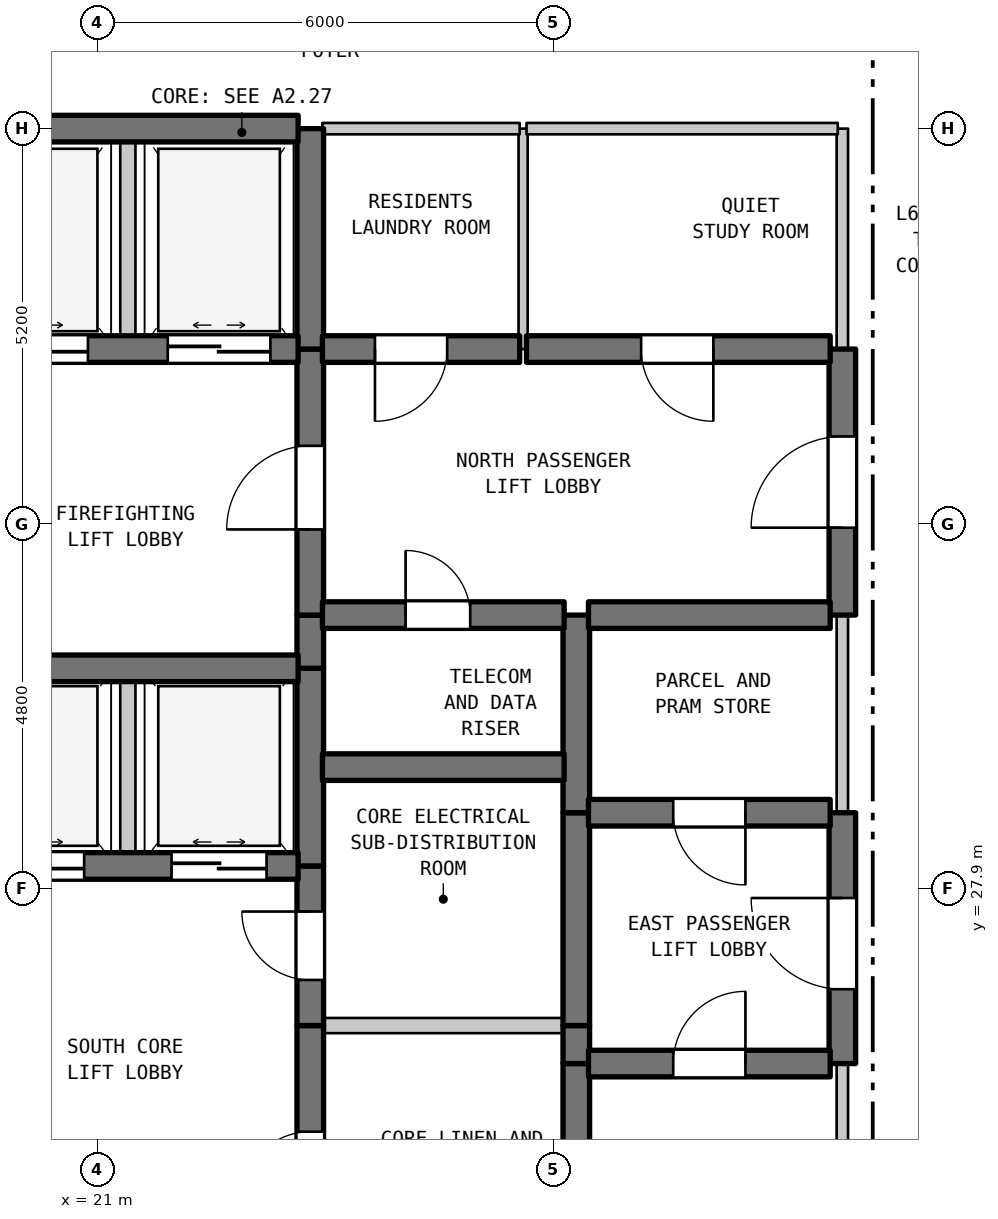
"""IFC4 building model, lengths in metres.
Left out: names, types, materials, properties, quantities, classifications, styles, units other than length and angle.
Written with IfcOpenShell. Run it as: python <this file> out.ifc"""

import sys

from ifc_helpers import new_model, si_unit, direction, frame, frame_2d, origin, place, context, subcontext, project, spatial, rectangle, extrude, element, fill, save


model = new_model("IFC4")
c1 = context("Model", 3, precision=1e-05, world=origin(), true_north=direction((0.0, 1.0)))
c2 = subcontext(c1, "Body", "Model", "MODEL_VIEW")
j1 = project(units=[si_unit("LENGTHUNIT", "METRE"), si_unit("PLANEANGLEUNIT", "RADIAN")], contexts=[c1])
p1 = place(None, origin())
s1 = spatial("IfcSite", under=j1, at=p1, CompositionType="ELEMENT")
p2 = place(p1, origin())
s2 = spatial("IfcBuilding", under=s1, at=p2, CompositionType="ELEMENT")
p3 = place(p2, frame((0.0, 0.0, 269.5)))
s3 = spatial("IfcBuildingStorey", under=s2, at=p3, CompositionType="ELEMENT", Elevation=269.5)
p4 = place(p3, frame((21.4, 28.2, 0.0), z_axis=(0.0, 0.0, 1.0), x_axis=(0.0, 1.0, 0.0)))
e1 = element("IfcWall", 1, at=p4, inside=s3, PredefinedType="STANDARD", context=c2, shape_type="SweptSolid", body=[
    extrude(rectangle(XDim=2.6, YDim=0.2, at=frame_2d((1.3, 0.0))), origin(), (0.0, 0.0, 1.0), 3.39),
])
p5 = place(p3, frame((21.4, 35.0, 0.0), z_axis=(0.0, 0.0, 1.0), x_axis=(0.0, 1.0, 0.0)))
e2 = element("IfcWall", 2, at=p5, inside=s3, PredefinedType="STANDARD", context=c2, shape_type="SweptSolid", body=[
    extrude(rectangle(XDim=2.9, YDim=0.2, at=frame_2d((1.45, 0.0))), origin(), (0.0, 0.0, 1.0), 3.39),
])
p6 = place(p3, frame((23.8, 19.5, 0.0), z_axis=(0.0, 0.0, 1.0), x_axis=(0.0, 1.0, 0.0)))
e3 = element("IfcWall", 3, at=p6, inside=s3, PredefinedType="SHEAR", context=c2, shape_type="SweptSolid", body=[
    extrude(rectangle(XDim=6.6, YDim=0.35, at=frame_2d((3.3, 0.0))), origin(), (0.0, 0.0, 1.0), 3.39),
])
p7 = place(p6, frame((4.304, 0.0, 0.0)))
e4 = element("IfcOpeningElement", 4, at=p7, cuts=e3, PredefinedType="OPENING", context=c2, shape_type="SweptSolid", body=[
    extrude(rectangle(XDim=0.9, YDim=2.15, at=frame_2d((0.45, 1.075))), frame((0.0, 0.185, 0.0), z_axis=(0.0, -1.0, 0.0), x_axis=(1.0, 0.0, 0.0)), (0.0, 0.0, 1.0), 0.37),
])
p8 = place(p3, frame((23.8, 26.1, 0.0), z_axis=(0.0, 0.0, 1.0), x_axis=(0.0, 1.0, 0.0)))
e5 = element("IfcWall", 5, at=p8, inside=s3, PredefinedType="SHEAR", context=c2, shape_type="SweptSolid", body=[
    extrude(rectangle(XDim=2.1, YDim=0.35, at=frame_2d((1.05, 0.0))), origin(), (0.0, 0.0, 1.0), 3.39),
])
p9 = place(p8, frame((0.6, 0.0, 0.0)))
e6 = element("IfcOpeningElement", 6, at=p9, cuts=e5, PredefinedType="OPENING", context=c2, shape_type="SweptSolid", body=[
    extrude(rectangle(XDim=0.9, YDim=2.15, at=frame_2d((0.45, 1.075))), frame((0.0, 0.185, 0.0), z_axis=(0.0, -1.0, 0.0), x_axis=(1.0, 0.0, 0.0)), (0.0, 0.0, 1.0), 0.37),
])
p10 = place(p3, frame((23.8, 28.2, 0.0), z_axis=(0.0, 0.0, 1.0), x_axis=(0.0, 1.0, 0.0)))
e7 = element("IfcWall", 7, at=p10, inside=s3, PredefinedType="SHEAR", context=c2, shape_type="SweptSolid", body=[
    extrude(rectangle(XDim=2.6, YDim=0.35, at=frame_2d((1.3, 0.0))), origin(), (0.0, 0.0, 1.0), 3.39),
])
p11 = place(p3, frame((23.8, 30.8, 0.0), z_axis=(0.0, 0.0, 1.0), x_axis=(0.0, 1.0, 0.0)))
e8 = element("IfcWall", 8, at=p11, inside=s3, PredefinedType="SHEAR", context=c2, shape_type="SweptSolid", body=[
    extrude(rectangle(XDim=0.7, YDim=0.35, at=frame_2d((0.35, 0.0))), origin(), (0.0, 0.0, 1.0), 3.39),
])
p12 = place(p3, frame((23.8, 31.5, 0.0), z_axis=(0.0, 0.0, 1.0), x_axis=(0.0, 1.0, 0.0)))
e9 = element("IfcWall", 9, at=p12, inside=s3, PredefinedType="SHEAR", context=c2, shape_type="SweptSolid", body=[
    extrude(rectangle(XDim=3.5, YDim=0.35, at=frame_2d((1.75, 0.0))), origin(), (0.0, 0.0, 1.0), 3.39),
])
p13 = place(p12, frame((1.127, 0.0, 0.0)))
e10 = element("IfcOpeningElement", 10, at=p13, cuts=e9, PredefinedType="OPENING", context=c2, shape_type="SweptSolid", body=[
    extrude(rectangle(XDim=1.1, YDim=2.15, at=frame_2d((0.55, 1.075))), frame((0.0, 0.185, 0.0), z_axis=(0.0, -1.0, 0.0), x_axis=(1.0, 0.0, 0.0)), (0.0, 0.0, 1.0), 0.37),
])
p14 = place(p3, frame((23.8, 35.0, 0.0), z_axis=(0.0, 0.0, 1.0), x_axis=(0.0, 1.0, 0.0)))
e11 = element("IfcWall", 11, at=p14, inside=s3, PredefinedType="SHEAR", context=c2, shape_type="SweptSolid", body=[
    extrude(rectangle(XDim=2.9, YDim=0.35, at=frame_2d((1.45, 0.0))), origin(), (0.0, 0.0, 1.0), 3.39),
])
p15 = place(p3, frame((26.6, 35.0, 0.0), z_axis=(0.0, 0.0, 1.0), x_axis=(0.0, 1.0, 0.0)))
e12 = element("IfcWall", 12, at=p15, inside=s3, PredefinedType="PARTITIONING", context=c2, shape_type="SweptSolid", body=[
    extrude(rectangle(XDim=2.9, YDim=0.12, at=frame_2d((1.45, 0.0))), origin(), (0.0, 0.0, 1.0), 3.39),
])
p16 = place(p3, frame((27.3, 22.7, 0.0), z_axis=(0.0, 0.0, 1.0), x_axis=(0.0, 1.0, 0.0)))
e13 = element("IfcWall", 13, at=p16, inside=s3, PredefinedType="SHEAR", context=c2, shape_type="SweptSolid", body=[
    extrude(rectangle(XDim=2.9, YDim=0.35, at=frame_2d((1.45, 0.0))), origin(), (0.0, 0.0, 1.0), 3.39),
])
p17 = place(p3, frame((27.3, 25.6, 0.0), z_axis=(0.0, 0.0, 1.0), x_axis=(0.0, 1.0, 0.0)))
e14 = element("IfcWall", 14, at=p17, inside=s3, PredefinedType="SHEAR", context=c2, shape_type="SweptSolid", body=[
    extrude(rectangle(XDim=0.5, YDim=0.35, at=frame_2d((0.25, 0.0))), origin(), (0.0, 0.0, 1.0), 3.39),
])
p18 = place(p3, frame((27.3, 26.1, 0.0), z_axis=(0.0, 0.0, 1.0), x_axis=(0.0, 1.0, 0.0)))
e15 = element("IfcWall", 15, at=p18, inside=s3, PredefinedType="SHEAR", context=c2, shape_type="SweptSolid", body=[
    extrude(rectangle(XDim=2.8, YDim=0.35, at=frame_2d((1.4, 0.0))), origin(), (0.0, 0.0, 1.0), 3.39),
])
p19 = place(p3, frame((27.3, 28.9, 0.0), z_axis=(0.0, 0.0, 1.0), x_axis=(0.0, 1.0, 0.0)))
e16 = element("IfcWall", 16, at=p19, inside=s3, PredefinedType="SHEAR", context=c2, shape_type="SweptSolid", body=[
    extrude(rectangle(XDim=2.6, YDim=0.35, at=frame_2d((1.3, 0.0))), origin(), (0.0, 0.0, 1.0), 3.39),
])
p20 = place(p3, frame((30.8, 22.7, 0.0), z_axis=(0.0, 0.0, 1.0), x_axis=(0.0, 1.0, 0.0)))
e17 = element("IfcWall", 17, at=p20, inside=s3, PredefinedType="STANDARD", context=c2, shape_type="SweptSolid", body=[
    extrude(rectangle(XDim=2.9, YDim=0.15, at=frame_2d((1.45, 0.0))), origin(), (0.0, 0.0, 1.0), 3.39),
])
p21 = place(p3, frame((30.8, 25.6, 0.0), z_axis=(0.0, 0.0, 1.0), x_axis=(0.0, 1.0, 0.0)))
e18 = element("IfcWall", 18, at=p21, inside=s3, PredefinedType="SHEAR", context=c2, shape_type="SweptSolid", body=[
    extrude(rectangle(XDim=3.3, YDim=0.35, at=frame_2d((1.65, 0.0))), origin(), (0.0, 0.0, 1.0), 3.39),
])
p22 = place(p21, frame((0.978, 0.0, 0.0)))
e19 = element("IfcOpeningElement", 19, at=p22, cuts=e18, PredefinedType="OPENING", context=c2, shape_type="SweptSolid", body=[
    extrude(rectangle(XDim=1.2, YDim=2.2, at=frame_2d((0.6, 1.1))), frame((0.0, 0.185, 0.0), z_axis=(0.0, -1.0, 0.0), x_axis=(1.0, 0.0, 0.0)), (0.0, 0.0, 1.0), 0.37),
])
p23 = place(p3, frame((30.8, 28.9, 0.0), z_axis=(0.0, 0.0, 1.0), x_axis=(0.0, 1.0, 0.0)))
e20 = element("IfcWall", 20, at=p23, inside=s3, PredefinedType="STANDARD", context=c2, shape_type="SweptSolid", body=[
    extrude(rectangle(XDim=2.6, YDim=0.15, at=frame_2d((1.3, 0.0))), origin(), (0.0, 0.0, 1.0), 3.39),
])
p24 = place(p3, frame((30.8, 31.5, 0.0), z_axis=(0.0, 0.0, 1.0), x_axis=(0.0, 1.0, 0.0)))
e21 = element("IfcWall", 21, at=p24, inside=s3, PredefinedType="SHEAR", context=c2, shape_type="SweptSolid", body=[
    extrude(rectangle(XDim=3.5, YDim=0.35, at=frame_2d((1.75, 0.0))), origin(), (0.0, 0.0, 1.0), 3.39),
])
p25 = place(p24, frame((1.15, 0.0, 0.0)))
e22 = element("IfcOpeningElement", 22, at=p25, cuts=e21, PredefinedType="OPENING", context=c2, shape_type="SweptSolid", body=[
    extrude(rectangle(XDim=1.2, YDim=2.2, at=frame_2d((0.6, 1.1))), frame((0.0, 0.185, 0.0), z_axis=(0.0, -1.0, 0.0), x_axis=(1.0, 0.0, 0.0)), (0.0, 0.0, 1.0), 0.37),
])
p26 = place(p3, frame((30.8, 35.0, 0.0), z_axis=(0.0, 0.0, 1.0), x_axis=(0.0, 1.0, 0.0)))
e23 = element("IfcWall", 23, at=p26, inside=s3, PredefinedType="STANDARD", context=c2, shape_type="SweptSolid", body=[
    extrude(rectangle(XDim=2.9, YDim=0.15, at=frame_2d((1.45, 0.0))), origin(), (0.0, 0.0, 1.0), 3.39),
])
p27 = place(p3, frame((27.46, 25.6, 0.0), z_axis=(0.0, 0.0, 1.0), x_axis=(1.0, 0.0, 0.0)))
e24 = element("IfcWall", 24, at=p27, inside=s3, PredefinedType="SHEAR", context=c2, shape_type="SweptSolid", body=[
    extrude(rectangle(XDim=3.18, YDim=0.35, at=frame_2d((1.59, 0.0))), origin(), (0.0, 0.0, 1.0), 3.39),
])
p28 = place(p27, frame((1.115, 0.0, 0.0)))
e25 = element("IfcOpeningElement", 25, at=p28, cuts=e24, PredefinedType="OPENING", context=c2, shape_type="SweptSolid", body=[
    extrude(rectangle(XDim=0.95, YDim=2.15, at=frame_2d((0.475, 1.075))), frame((0.0, 0.185, 0.0), z_axis=(0.0, -1.0, 0.0), x_axis=(1.0, 0.0, 0.0)), (0.0, 0.0, 1.0), 0.37),
])
p29 = place(p3, frame((23.96, 26.1, 0.0), z_axis=(0.0, 0.0, 1.0), x_axis=(1.0, 0.0, 0.0)))
e26 = element("IfcWall", 26, at=p29, inside=s3, PredefinedType="STANDARD", context=c2, shape_type="SweptSolid", body=[
    extrude(rectangle(XDim=3.18, YDim=0.2, at=frame_2d((1.59, 0.0))), origin(), (0.0, 0.0, 1.0), 3.39),
])
p30 = place(p3, frame((19.16, 28.2, 0.0), z_axis=(0.0, 0.0, 1.0), x_axis=(1.0, 0.0, 0.0)))
e27 = element("IfcWall", 27, at=p30, inside=s3, PredefinedType="SHEAR", context=c2, shape_type="SweptSolid", body=[
    extrude(rectangle(XDim=4.48, YDim=0.35, at=frame_2d((2.24, 0.0))), origin(), (0.0, 0.0, 1.0), 3.39),
])
p31 = place(p30, frame((0.415, 0.0, 0.0)))
e28 = element("IfcOpeningElement", 28, at=p31, cuts=e27, PredefinedType="OPENING", context=c2, shape_type="SweptSolid", body=[
    extrude(rectangle(XDim=1.25, YDim=2.2, at=frame_2d((0.625, 1.1))), frame((0.0, 0.185, 0.0), z_axis=(0.0, -1.0, 0.0), x_axis=(1.0, 0.0, 0.0)), (0.0, 0.0, 1.0), 0.37),
])
p32 = place(p30, frame((2.815, 0.0, 0.0)))
e29 = element("IfcOpeningElement", 29, at=p32, cuts=e27, PredefinedType="OPENING", context=c2, shape_type="SweptSolid", body=[
    extrude(rectangle(XDim=1.25, YDim=2.2, at=frame_2d((0.625, 1.1))), frame((0.0, 0.185, 0.0), z_axis=(0.0, -1.0, 0.0), x_axis=(1.0, 0.0, 0.0)), (0.0, 0.0, 1.0), 0.37),
])
p33 = place(p3, frame((27.46, 28.9, 0.0), z_axis=(0.0, 0.0, 1.0), x_axis=(1.0, 0.0, 0.0)))
e30 = element("IfcWall", 30, at=p33, inside=s3, PredefinedType="SHEAR", context=c2, shape_type="SweptSolid", body=[
    extrude(rectangle(XDim=3.18, YDim=0.35, at=frame_2d((1.59, 0.0))), origin(), (0.0, 0.0, 1.0), 3.39),
])
p34 = place(p33, frame((1.115, 0.0, 0.0)))
e31 = element("IfcOpeningElement", 31, at=p34, cuts=e30, PredefinedType="OPENING", context=c2, shape_type="SweptSolid", body=[
    extrude(rectangle(XDim=0.95, YDim=2.15, at=frame_2d((0.475, 1.075))), frame((0.0, 0.185, 0.0), z_axis=(0.0, -1.0, 0.0), x_axis=(1.0, 0.0, 0.0)), (0.0, 0.0, 1.0), 0.37),
])
p35 = place(p3, frame((23.96, 29.5, 0.0), z_axis=(0.0, 0.0, 1.0), x_axis=(1.0, 0.0, 0.0)))
e32 = element("IfcWall", 32, at=p35, inside=s3, PredefinedType="SHEAR", context=c2, shape_type="SweptSolid", body=[
    extrude(rectangle(XDim=3.18, YDim=0.35, at=frame_2d((1.59, 0.0))), origin(), (0.0, 0.0, 1.0), 3.39),
])
p36 = place(p3, frame((19.16, 30.8, 0.0), z_axis=(0.0, 0.0, 1.0), x_axis=(1.0, 0.0, 0.0)))
e33 = element("IfcWall", 33, at=p36, inside=s3, PredefinedType="SHEAR", context=c2, shape_type="SweptSolid", body=[
    extrude(rectangle(XDim=4.48, YDim=0.35, at=frame_2d((2.24, 0.0))), origin(), (0.0, 0.0, 1.0), 3.39),
])
p37 = place(p3, frame((23.96, 31.5, 0.0), z_axis=(0.0, 0.0, 1.0), x_axis=(1.0, 0.0, 0.0)))
e34 = element("IfcWall", 34, at=p37, inside=s3, PredefinedType="SHEAR", context=c2, shape_type="SweptSolid", body=[
    extrude(rectangle(XDim=3.18, YDim=0.35, at=frame_2d((1.59, 0.0))), origin(), (0.0, 0.0, 1.0), 3.39),
])
p38 = place(p37, frame((1.094, 0.0, 0.0)))
e35 = element("IfcOpeningElement", 35, at=p38, cuts=e34, PredefinedType="OPENING", context=c2, shape_type="SweptSolid", body=[
    extrude(rectangle(XDim=0.85, YDim=2.1, at=frame_2d((0.425, 1.05))), frame((0.0, 0.185, 0.0), z_axis=(0.0, -1.0, 0.0), x_axis=(1.0, 0.0, 0.0)), (0.0, 0.0, 1.0), 0.37),
])
p39 = place(p3, frame((27.46, 31.5, 0.0), z_axis=(0.0, 0.0, 1.0), x_axis=(1.0, 0.0, 0.0)))
e36 = element("IfcWall", 36, at=p39, inside=s3, PredefinedType="SHEAR", context=c2, shape_type="SweptSolid", body=[
    extrude(rectangle(XDim=3.18, YDim=0.35, at=frame_2d((1.59, 0.0))), origin(), (0.0, 0.0, 1.0), 3.39),
])
p40 = place(p3, frame((19.16, 35.0, 0.0), z_axis=(0.0, 0.0, 1.0), x_axis=(1.0, 0.0, 0.0)))
e37 = element("IfcWall", 37, at=p40, inside=s3, PredefinedType="SHEAR", context=c2, shape_type="SweptSolid", body=[
    extrude(rectangle(XDim=4.48, YDim=0.35, at=frame_2d((2.24, 0.0))), origin(), (0.0, 0.0, 1.0), 3.39),
])
p41 = place(p40, frame((0.365, 0.0, 0.0)))
e38 = element("IfcOpeningElement", 38, at=p41, cuts=e37, PredefinedType="OPENING", context=c2, shape_type="SweptSolid", body=[
    extrude(rectangle(XDim=1.35, YDim=2.2, at=frame_2d((0.675, 1.1))), frame((0.0, 0.185, 0.0), z_axis=(0.0, -1.0, 0.0), x_axis=(1.0, 0.0, 0.0)), (0.0, 0.0, 1.0), 0.37),
])
p42 = place(p40, frame((2.765, 0.0, 0.0)))
e39 = element("IfcOpeningElement", 39, at=p42, cuts=e37, PredefinedType="OPENING", context=c2, shape_type="SweptSolid", body=[
    extrude(rectangle(XDim=1.35, YDim=2.2, at=frame_2d((0.675, 1.1))), frame((0.0, 0.185, 0.0), z_axis=(0.0, -1.0, 0.0), x_axis=(1.0, 0.0, 0.0)), (0.0, 0.0, 1.0), 0.37),
])
p43 = place(p3, frame((23.96, 35.0, 0.0), z_axis=(0.0, 0.0, 1.0), x_axis=(1.0, 0.0, 0.0)))
e40 = element("IfcWall", 40, at=p43, inside=s3, PredefinedType="SHEAR", context=c2, shape_type="SweptSolid", body=[
    extrude(rectangle(XDim=2.595, YDim=0.35, at=frame_2d((1.297, 0.0))), origin(), (0.0, 0.0, 1.0), 3.39),
])
p44 = place(p43, frame((0.691, 0.0, 0.0)))
e41 = element("IfcOpeningElement", 41, at=p44, cuts=e40, PredefinedType="OPENING", context=c2, shape_type="SweptSolid", body=[
    extrude(rectangle(XDim=0.95, YDim=2.15, at=frame_2d((0.475, 1.075))), frame((0.0, 0.185, 0.0), z_axis=(0.0, -1.0, 0.0), x_axis=(1.0, 0.0, 0.0)), (0.0, 0.0, 1.0), 0.37),
])
p45 = place(p3, frame((26.645, 35.0, 0.0), z_axis=(0.0, 0.0, 1.0), x_axis=(1.0, 0.0, 0.0)))
e42 = element("IfcWall", 42, at=p45, inside=s3, PredefinedType="SHEAR", context=c2, shape_type="SweptSolid", body=[
    extrude(rectangle(XDim=3.995, YDim=0.35, at=frame_2d((1.998, 0.0))), origin(), (0.0, 0.0, 1.0), 3.39),
])
p46 = place(p45, frame((1.508, 0.0, 0.0)))
e43 = element("IfcOpeningElement", 43, at=p46, cuts=e42, PredefinedType="OPENING", context=c2, shape_type="SweptSolid", body=[
    extrude(rectangle(XDim=0.95, YDim=2.15, at=frame_2d((0.475, 1.075))), frame((0.0, 0.185, 0.0), z_axis=(0.0, -1.0, 0.0), x_axis=(1.0, 0.0, 0.0)), (0.0, 0.0, 1.0), 0.37),
])
p47 = place(p3, frame((19.16, 37.9, 0.0), z_axis=(0.0, 0.0, 1.0), x_axis=(1.0, 0.0, 0.0)))
e44 = element("IfcWall", 44, at=p47, inside=s3, PredefinedType="SHEAR", context=c2, shape_type="SweptSolid", body=[
    extrude(rectangle(XDim=4.48, YDim=0.35, at=frame_2d((2.24, 0.0))), origin(), (0.0, 0.0, 1.0), 3.39),
])
p48 = place(p3, frame((23.96, 37.9, 0.0), z_axis=(0.0, 0.0, 1.0), x_axis=(1.0, 0.0, 0.0)))
e45 = element("IfcWall", 45, at=p48, inside=s3, PredefinedType="STANDARD", context=c2, shape_type="SweptSolid", body=[
    extrude(rectangle(XDim=2.595, YDim=0.15, at=frame_2d((1.297, 0.0))), origin(), (0.0, 0.0, 1.0), 2.89),
])
p49 = place(p3, frame((26.645, 37.9, 0.0), z_axis=(0.0, 0.0, 1.0), x_axis=(1.0, 0.0, 0.0)))
e46 = element("IfcWall", 46, at=p49, inside=s3, PredefinedType="STANDARD", context=c2, shape_type="SweptSolid", body=[
    extrude(rectangle(XDim=4.095, YDim=0.15, at=frame_2d((2.047, 0.0))), origin(), (0.0, 0.0, 1.0), 2.89),
])
p50 = place(p7, origin())
e47 = element("IfcDoor", 47, at=p50, inside=s3, OperationType="SINGLE_SWING_LEFT", PredefinedType="DOOR", context=c2, shape_type="SweptSolid", body=[
    extrude(rectangle(XDim=0.9, YDim=2.15, at=frame_2d((0.45, 1.075))), frame((0.0, 0.025, 0.0), z_axis=(0.0, -1.0, 0.0), x_axis=(1.0, 0.0, 0.0)), (0.0, 0.0, 1.0), 0.05),
])
fill(e4, e47)
p51 = place(p9, origin())
e48 = element("IfcDoor", 48, at=p51, inside=s3, OperationType="SINGLE_SWING_RIGHT", PredefinedType="DOOR", context=c2, shape_type="SweptSolid", body=[
    extrude(rectangle(XDim=0.9, YDim=2.15, at=frame_2d((0.45, 1.075))), frame((0.0, 0.025, 0.0), z_axis=(0.0, -1.0, 0.0), x_axis=(1.0, 0.0, 0.0)), (0.0, 0.0, 1.0), 0.05),
])
fill(e6, e48)
p52 = place(p13, origin())
e49 = element("IfcDoor", 49, at=p52, inside=s3, OperationType="SINGLE_SWING_LEFT", PredefinedType="DOOR", context=c2, shape_type="SweptSolid", body=[
    extrude(rectangle(XDim=1.1, YDim=2.15, at=frame_2d((0.55, 1.075))), frame((0.0, 0.025, 0.0), z_axis=(0.0, -1.0, 0.0), x_axis=(1.0, 0.0, 0.0)), (0.0, 0.0, 1.0), 0.05),
])
fill(e10, e49)
p53 = place(p22, origin())
e50 = element("IfcDoor", 50, at=p53, inside=s3, OperationType="SINGLE_SWING_RIGHT", PredefinedType="DOOR", context=c2, shape_type="SweptSolid", body=[
    extrude(rectangle(XDim=1.2, YDim=2.2, at=frame_2d((0.6, 1.1))), frame((0.0, 0.025, 0.0), z_axis=(0.0, -1.0, 0.0), x_axis=(1.0, 0.0, 0.0)), (0.0, 0.0, 1.0), 0.05),
])
fill(e19, e50)
p54 = place(p25, origin())
e51 = element("IfcDoor", 51, at=p54, inside=s3, OperationType="SINGLE_SWING_LEFT", PredefinedType="DOOR", context=c2, shape_type="SweptSolid", body=[
    extrude(rectangle(XDim=1.2, YDim=2.2, at=frame_2d((0.6, 1.1))), frame((0.0, 0.025, 0.0), z_axis=(0.0, -1.0, 0.0), x_axis=(1.0, 0.0, 0.0)), (0.0, 0.0, 1.0), 0.05),
])
fill(e22, e51)
p55 = place(p28, origin())
e52 = element("IfcDoor", 52, at=p55, inside=s3, OperationType="SINGLE_SWING_RIGHT", PredefinedType="DOOR", context=c2, shape_type="SweptSolid", body=[
    extrude(rectangle(XDim=0.95, YDim=2.15, at=frame_2d((0.475, 1.075))), frame((0.0, 0.025, 0.0), z_axis=(0.0, -1.0, 0.0), x_axis=(1.0, 0.0, 0.0)), (0.0, 0.0, 1.0), 0.05),
])
fill(e25, e52)
p56 = place(p31, origin())
e53 = element("IfcDoor", 53, at=p56, inside=s3, OperationType="DOUBLE_DOOR_SLIDING", PredefinedType="DOOR", context=c2, shape_type="SweptSolid", body=[
    extrude(rectangle(XDim=1.25, YDim=2.2, at=frame_2d((0.625, 1.1))), frame((0.0, 0.025, 0.0), z_axis=(0.0, -1.0, 0.0), x_axis=(1.0, 0.0, 0.0)), (0.0, 0.0, 1.0), 0.05),
])
fill(e28, e53)
p57 = place(p32, origin())
e54 = element("IfcDoor", 54, at=p57, inside=s3, OperationType="DOUBLE_DOOR_SLIDING", PredefinedType="DOOR", context=c2, shape_type="SweptSolid", body=[
    extrude(rectangle(XDim=1.25, YDim=2.2, at=frame_2d((0.625, 1.1))), frame((0.0, 0.025, 0.0), z_axis=(0.0, -1.0, 0.0), x_axis=(1.0, 0.0, 0.0)), (0.0, 0.0, 1.0), 0.05),
])
fill(e29, e54)
p58 = place(p34, frame((0.95, 0.0, 0.0), z_axis=(0.0, 0.0, 1.0), x_axis=(-1.0, 0.0, 0.0)))
e55 = element("IfcDoor", 55, at=p58, inside=s3, OperationType="SINGLE_SWING_RIGHT", PredefinedType="DOOR", context=c2, shape_type="SweptSolid", body=[
    extrude(rectangle(XDim=0.95, YDim=2.15, at=frame_2d((0.475, 1.075))), frame((0.0, 0.025, 0.0), z_axis=(0.0, -1.0, 0.0), x_axis=(1.0, 0.0, 0.0)), (0.0, 0.0, 1.0), 0.05),
])
fill(e31, e55)
p59 = place(p38, origin())
e56 = element("IfcDoor", 56, at=p59, inside=s3, OperationType="SINGLE_SWING_LEFT", PredefinedType="DOOR", context=c2, shape_type="SweptSolid", body=[
    extrude(rectangle(XDim=0.85, YDim=2.1, at=frame_2d((0.425, 1.05))), frame((0.0, 0.025, 0.0), z_axis=(0.0, -1.0, 0.0), x_axis=(1.0, 0.0, 0.0)), (0.0, 0.0, 1.0), 0.05),
])
fill(e35, e56)
p60 = place(p41, origin())
e57 = element("IfcDoor", 57, at=p60, inside=s3, OperationType="DOUBLE_DOOR_SLIDING", PredefinedType="DOOR", context=c2, shape_type="SweptSolid", body=[
    extrude(rectangle(XDim=1.35, YDim=2.2, at=frame_2d((0.675, 1.1))), frame((0.0, 0.025, 0.0), z_axis=(0.0, -1.0, 0.0), x_axis=(1.0, 0.0, 0.0)), (0.0, 0.0, 1.0), 0.05),
])
fill(e38, e57)
p61 = place(p42, origin())
e58 = element("IfcDoor", 58, at=p61, inside=s3, OperationType="DOUBLE_DOOR_SLIDING", PredefinedType="DOOR", context=c2, shape_type="SweptSolid", body=[
    extrude(rectangle(XDim=1.35, YDim=2.2, at=frame_2d((0.675, 1.1))), frame((0.0, 0.025, 0.0), z_axis=(0.0, -1.0, 0.0), x_axis=(1.0, 0.0, 0.0)), (0.0, 0.0, 1.0), 0.05),
])
fill(e39, e58)
p62 = place(p44, frame((0.95, 0.0, 0.0), z_axis=(0.0, 0.0, 1.0), x_axis=(-1.0, 0.0, 0.0)))
e59 = element("IfcDoor", 59, at=p62, inside=s3, OperationType="SINGLE_SWING_LEFT", PredefinedType="DOOR", context=c2, shape_type="SweptSolid", body=[
    extrude(rectangle(XDim=0.95, YDim=2.15, at=frame_2d((0.475, 1.075))), frame((0.0, 0.025, 0.0), z_axis=(0.0, -1.0, 0.0), x_axis=(1.0, 0.0, 0.0)), (0.0, 0.0, 1.0), 0.05),
])
fill(e41, e59)
p63 = place(p46, frame((0.95, 0.0, 0.0), z_axis=(0.0, 0.0, 1.0), x_axis=(-1.0, 0.0, 0.0)))
e60 = element("IfcDoor", 60, at=p63, inside=s3, OperationType="SINGLE_SWING_RIGHT", PredefinedType="DOOR", context=c2, shape_type="SweptSolid", body=[
    extrude(rectangle(XDim=0.95, YDim=2.15, at=frame_2d((0.475, 1.075))), frame((0.0, 0.025, 0.0), z_axis=(0.0, -1.0, 0.0), x_axis=(1.0, 0.0, 0.0)), (0.0, 0.0, 1.0), 0.05),
])
fill(e43, e60)
save(model, sys.argv[1])
